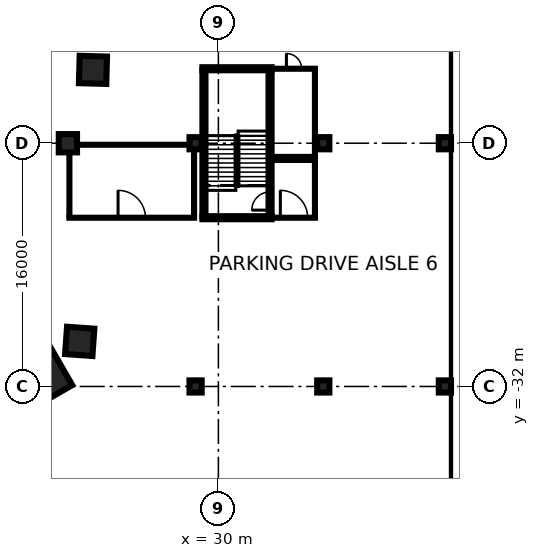
"""IFC4 building model, lengths in metres.
Left out: names, types, materials, properties, quantities, classifications, styles, units other than length and angle.
Written with IfcOpenShell. Run it as: python <this file> out.ifc"""

import sys

from ifc_helpers import new_model, si_unit, direction, frame, frame_2d, origin, origin_2d, place, context, subcontext, project, spatial, rectangle, extrude, element, fill, save


model = new_model("IFC4")
c1 = context("Model", 3, precision=1e-05, world=origin(), true_north=direction((0.0, 1.0)))
c2 = subcontext(c1, "Body", "Model", "MODEL_VIEW")
j1 = project(units=[si_unit("LENGTHUNIT", "METRE"), si_unit("PLANEANGLEUNIT", "RADIAN")], contexts=[c1])
p1 = place(None, origin())
s1 = spatial("IfcSite", under=j1, at=p1, CompositionType="ELEMENT")
p2 = place(p1, origin())
s2 = spatial("IfcBuilding", under=s1, at=p2, CompositionType="ELEMENT")
p3 = place(p2, frame((0.0, 0.0, -12.0)))
s3 = spatial("IfcBuildingStorey", under=s2, at=p3, CompositionType="ELEMENT", Elevation=-12.0)
p4 = place(p3, frame((45.75, -80.0, 0.0), z_axis=(0.0, 0.0, 1.0), x_axis=(0.0, 1.0, 0.0)))
e1 = element("IfcWall", 1, at=p4, inside=s3, PredefinedType="USERDEFINED", context=c2, shape_type="SweptSolid", body=[
    extrude(rectangle(XDim=160.0, YDim=0.9, at=frame_2d((80.0, 0.0))), origin(), (0.0, 0.0, 1.0), 11.55),
])
p5 = place(p2, frame((0.0, 0.0, -7.2)))
s4 = spatial("IfcBuildingStorey", under=s2, at=p5, CompositionType="ELEMENT", Elevation=-7.2)
p6 = place(p5, frame((17.865, -30.942, -0.4), z_axis=(0.0, 0.0, 1.0), x_axis=(-0.5, 0.866025403784, 0.0)))
e2 = element("IfcColumn", 2, at=p6, inside=s4, PredefinedType="COLUMN", context=c2, shape_type="SweptSolid", body=[
    extrude(rectangle(XDim=4.2, YDim=3.4, at=origin_2d()), origin(), (0.0, 0.0, 1.0), 3.6),
])
for number, where, z_axis, x_axis in (
    (3, (20.879, -29.034, -0.4), (0.0, 0.0, 1.0), (-0.998, 0.07, 0.0)),
    (4, (21.749, -11.174, -0.4), (0.0, 0.0, 1.0), (-1.0, 0.027, 0.0)),
):
    element("IfcColumn", number, at=place(p5, frame(where, z_axis=z_axis, x_axis=x_axis)), inside=s4, PredefinedType="COLUMN", context=c2, shape_type="SweptSolid", body=[
        extrude(rectangle(XDim=1.8, YDim=1.8, at=origin_2d()), origin(), (0.0, 0.0, 1.0), 3.6),
    ])
p7 = place(p5, frame((20.1, -16.0, -0.4), z_axis=(0.0, 0.0, 1.0), x_axis=(1.0, 0.0, 0.0)))
e5 = element("IfcColumn", 5, at=p7, inside=s4, PredefinedType="COLUMN", context=c2, shape_type="SweptSolid", body=[
    extrude(rectangle(XDim=1.2, YDim=1.2, at=origin_2d()), origin(), (0.0, 0.0, 1.0), 3.6),
])
for number, where, z_axis, x_axis in (
    (6, (28.5, -32.0, -0.4), (0.0, 0.0, 1.0), (1.0, 0.0, 0.0)),
    (7, (28.5, -16.0, -0.4), (0.0, 0.0, 1.0), (1.0, 0.0, 0.0)),
    (8, (36.9, -32.0, -0.4), (0.0, 0.0, 1.0), (1.0, 0.0, 0.0)),
    (9, (36.9, -16.0, -0.4), (0.0, 0.0, 1.0), (1.0, 0.0, 0.0)),
    (10, (44.9, -32.0, -0.4), (0.0, 0.0, 1.0), (1.0, 0.0, 0.0)),
    (11, (44.9, -16.0, -0.4), (0.0, 0.0, 1.0), (1.0, 0.0, 0.0)),
):
    element("IfcColumn", number, at=place(p5, frame(where, z_axis=z_axis, x_axis=x_axis)), inside=s4, PredefinedType="COLUMN", context=c2, shape_type="SweptSolid", body=[
        extrude(rectangle(XDim=0.8, YDim=0.8, at=origin_2d()), origin(), (0.0, 0.0, 1.0), 3.6),
    ])
p8 = place(p5, frame((20.1, -20.9, 0.0), z_axis=(0.0, 0.0, 1.0), x_axis=(1.0, 0.0, 0.0)))
e12 = element("IfcWall", 12, at=p8, inside=s4, PredefinedType="PARTITIONING", context=c2, shape_type="SweptSolid", body=[
    extrude(rectangle(XDim=8.4, YDim=0.2, at=frame_2d((4.2, 0.0))), origin(), (0.0, 0.0, 1.0), 3.2),
])
p9 = place(p8, frame((3.3, 0.0, 0.0)))
e13 = element("IfcOpeningElement", 13, at=p9, cuts=e12, PredefinedType="OPENING", context=c2, shape_type="SweptSolid", body=[
    extrude(rectangle(XDim=1.8, YDim=2.1, at=frame_2d((0.9, 1.05))), frame((0.0, 0.11, 0.0), z_axis=(0.0, -1.0, 0.0), x_axis=(1.0, 0.0, 0.0)), (0.0, 0.0, 1.0), 0.22),
])
p10 = place(p5, frame((20.1, -16.1, 0.0), z_axis=(0.0, 0.0, 1.0), x_axis=(1.0, 0.0, 0.0)))
e14 = element("IfcWall", 14, at=p10, inside=s4, PredefinedType="PARTITIONING", context=c2, shape_type="SweptSolid", body=[
    extrude(rectangle(XDim=8.4, YDim=0.2, at=frame_2d((4.2, 0.0))), origin(), (0.0, 0.0, 1.0), 3.2),
])
p11 = place(p5, frame((20.2, -20.8, 0.0), z_axis=(0.0, 0.0, 1.0), x_axis=(0.0, 1.0, 0.0)))
e15 = element("IfcWall", 15, at=p11, inside=s4, PredefinedType="PARTITIONING", context=c2, shape_type="SweptSolid", body=[
    extrude(rectangle(XDim=4.2, YDim=0.2, at=frame_2d((2.1, 0.0))), origin(), (0.0, 0.0, 1.0), 3.2),
])
p12 = place(p5, frame((28.4, -20.8, 0.0), z_axis=(0.0, 0.0, 1.0), x_axis=(0.0, 1.0, 0.0)))
e16 = element("IfcWall", 16, at=p12, inside=s4, PredefinedType="PARTITIONING", context=c2, shape_type="SweptSolid", body=[
    extrude(rectangle(XDim=4.4, YDim=0.2, at=frame_2d((2.2, 0.0))), origin(), (0.0, 0.0, 1.0), 3.2),
])
p13 = place(p5, frame((33.5, -20.9, 0.0), z_axis=(0.0, 0.0, 1.0), x_axis=(1.0, 0.0, 0.0)))
e17 = element("IfcWall", 17, at=p13, inside=s4, PredefinedType="PARTITIONING", context=c2, shape_type="SweptSolid", body=[
    extrude(rectangle(XDim=2.95, YDim=0.2, at=frame_2d((1.475, 0.0))), origin(), (0.0, 0.0, 1.0), 3.2),
])
p14 = place(p13, frame((0.575, 0.0, 0.0)))
e18 = element("IfcOpeningElement", 18, at=p14, cuts=e17, PredefinedType="OPENING", context=c2, shape_type="SweptSolid", body=[
    extrude(rectangle(XDim=1.8, YDim=2.1, at=frame_2d((0.9, 1.05))), frame((0.0, 0.11, 0.0), z_axis=(0.0, -1.0, 0.0), x_axis=(1.0, 0.0, 0.0)), (0.0, 0.0, 1.0), 0.22),
])
p15 = place(p5, frame((33.5, -17.1, 0.0), z_axis=(0.0, 0.0, 1.0), x_axis=(1.0, 0.0, 0.0)))
e19 = element("IfcWall", 19, at=p15, inside=s4, PredefinedType="PARTITIONING", context=c2, shape_type="SweptSolid", body=[
    extrude(rectangle(XDim=2.95, YDim=0.2, at=frame_2d((1.475, 0.0))), origin(), (0.0, 0.0, 1.0), 3.2),
])
p16 = place(p5, frame((36.35, -20.8, 0.0), z_axis=(0.0, 0.0, 1.0), x_axis=(0.0, 1.0, 0.0)))
e20 = element("IfcWall", 20, at=p16, inside=s4, PredefinedType="PARTITIONING", context=c2, shape_type="SweptSolid", body=[
    extrude(rectangle(XDim=3.6, YDim=0.2, at=frame_2d((1.8, 0.0))), origin(), (0.0, 0.0, 1.0), 3.2),
])
p17 = place(p5, frame((33.5, -16.9, 0.0), z_axis=(0.0, 0.0, 1.0), x_axis=(1.0, 0.0, 0.0)))
e21 = element("IfcWall", 21, at=p17, inside=s4, PredefinedType="PARTITIONING", context=c2, shape_type="SweptSolid", body=[
    extrude(rectangle(XDim=2.95, YDim=0.2, at=frame_2d((1.475, 0.0))), origin(), (0.0, 0.0, 1.0), 3.2),
])
p18 = place(p5, frame((33.5, -11.1, 0.0), z_axis=(0.0, 0.0, 1.0), x_axis=(1.0, 0.0, 0.0)))
e22 = element("IfcWall", 22, at=p18, inside=s4, PredefinedType="PARTITIONING", context=c2, shape_type="SweptSolid", body=[
    extrude(rectangle(XDim=2.95, YDim=0.2, at=frame_2d((1.475, 0.0))), origin(), (0.0, 0.0, 1.0), 3.2),
])
p19 = place(p18, frame((0.975, 0.0, 0.0)))
e23 = element("IfcOpeningElement", 23, at=p19, cuts=e22, PredefinedType="OPENING", context=c2, shape_type="SweptSolid", body=[
    extrude(rectangle(XDim=1.0, YDim=2.1, at=frame_2d((0.5, 1.05))), frame((0.0, 0.11, 0.0), z_axis=(0.0, -1.0, 0.0), x_axis=(1.0, 0.0, 0.0)), (0.0, 0.0, 1.0), 0.22),
])
p20 = place(p5, frame((36.35, -16.8, 0.0), z_axis=(0.0, 0.0, 1.0), x_axis=(0.0, 1.0, 0.0)))
e24 = element("IfcWall", 24, at=p20, inside=s4, PredefinedType="PARTITIONING", context=c2, shape_type="SweptSolid", body=[
    extrude(rectangle(XDim=5.6, YDim=0.2, at=frame_2d((2.8, 0.0))), origin(), (0.0, 0.0, 1.0), 3.2),
])
p21 = place(p5, frame((29.05, -20.8, 0.0), z_axis=(0.0, 0.0, 1.0), x_axis=(0.0, 1.0, 0.0)))
e25 = element("IfcWall", 25, at=p21, inside=s4, PredefinedType="SOLIDWALL", context=c2, shape_type="SweptSolid", body=[
    extrude(rectangle(XDim=9.6, YDim=0.2, at=frame_2d((4.8, 0.0))), origin(), (0.0, 0.0, 1.0), 3.2),
])
p22 = place(p5, frame((33.4, -20.8, 0.0), z_axis=(0.0, 0.0, 1.0), x_axis=(0.0, 1.0, 0.0)))
e26 = element("IfcWall", 26, at=p22, inside=s4, PredefinedType="SOLIDWALL", context=c2, shape_type="SweptSolid", body=[
    extrude(rectangle(XDim=9.6, YDim=0.2, at=frame_2d((4.8, 0.0))), origin(), (0.0, 0.0, 1.0), 3.2),
])
p23 = place(p22, frame((0.4, 0.0, 0.0)))
e27 = element("IfcOpeningElement", 27, at=p23, cuts=e26, PredefinedType="OPENING", context=c2, shape_type="SweptSolid", body=[
    extrude(rectangle(XDim=1.2, YDim=2.1, at=frame_2d((0.6, 1.05))), frame((0.0, 0.11, 0.0), z_axis=(0.0, -1.0, 0.0), x_axis=(1.0, 0.0, 0.0)), (0.0, 0.0, 1.0), 0.22),
])
for number, where, z_axis, x_axis in (
    (28, (33.5, -20.9, 0.0), (0.0, 0.0, 1.0), (-1.0, 0.0, 0.0)),
    (29, (28.95, -11.1, 0.0), (0.0, 0.0, 1.0), (1.0, 0.0, 0.0)),
):
    element("IfcWall", number, at=place(p5, frame(where, z_axis=z_axis, x_axis=x_axis)), inside=s4, PredefinedType="SOLIDWALL", context=c2, shape_type="SweptSolid", body=[
        extrude(rectangle(XDim=4.55, YDim=0.2, at=frame_2d((2.275, 0.0))), origin(), (0.0, 0.0, 1.0), 3.2),
    ])
p24 = place(p9, origin())
e30 = element("IfcDoor", 30, at=p24, inside=s4, OperationType="DOUBLE_DOOR_SINGLE_SWING", PredefinedType="DOOR", context=c2, shape_type="SweptSolid", body=[
    extrude(rectangle(XDim=1.8, YDim=2.1, at=frame_2d((0.9, 1.05))), frame((0.0, 0.025, 0.0), z_axis=(0.0, -1.0, 0.0), x_axis=(1.0, 0.0, 0.0)), (0.0, 0.0, 1.0), 0.05),
])
fill(e13, e30)
p25 = place(p14, origin())
e31 = element("IfcDoor", 31, at=p25, inside=s4, OperationType="DOUBLE_DOOR_SINGLE_SWING", PredefinedType="DOOR", context=c2, shape_type="SweptSolid", body=[
    extrude(rectangle(XDim=1.8, YDim=2.1, at=frame_2d((0.9, 1.05))), frame((0.0, 0.025, 0.0), z_axis=(0.0, -1.0, 0.0), x_axis=(1.0, 0.0, 0.0)), (0.0, 0.0, 1.0), 0.05),
])
fill(e18, e31)
p26 = place(p19, origin())
e32 = element("IfcDoor", 32, at=p26, inside=s4, OperationType="SINGLE_SWING_LEFT", PredefinedType="DOOR", context=c2, shape_type="SweptSolid", body=[
    extrude(rectangle(XDim=1.0, YDim=2.1, at=frame_2d((0.5, 1.05))), frame((0.0, 0.025, 0.0), z_axis=(0.0, -1.0, 0.0), x_axis=(1.0, 0.0, 0.0)), (0.0, 0.0, 1.0), 0.05),
])
fill(e23, e32)
p27 = place(p23, origin())
e33 = element("IfcDoor", 33, at=p27, inside=s4, OperationType="SINGLE_SWING_LEFT", PredefinedType="DOOR", context=c2, shape_type="SweptSolid", body=[
    extrude(rectangle(XDim=1.2, YDim=2.1, at=frame_2d((0.6, 1.05))), frame((0.0, 0.025, 0.0), z_axis=(0.0, -1.0, 0.0), x_axis=(1.0, 0.0, 0.0)), (0.0, 0.0, 1.0), 0.05),
])
fill(e27, e33)
save(model, sys.argv[1])
